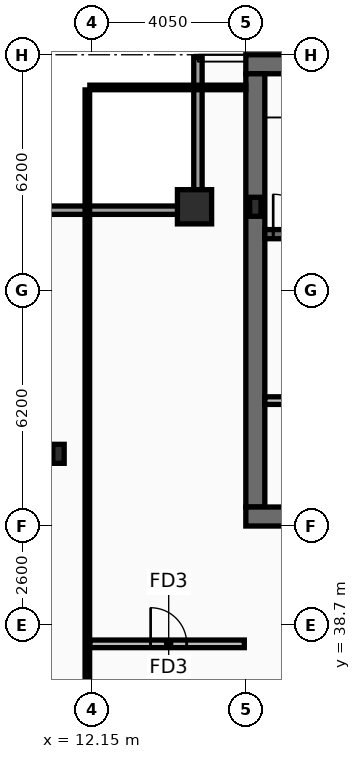
"""IFC4 building model, lengths in metres.
Left out: names, types, materials, properties, quantities, classifications, styles, units other than length and angle.
Written with IfcOpenShell. Run it as: python <this file> out.ifc"""

import sys

from ifc_helpers import new_model, si_unit, direction, frame, frame_2d, origin, origin_2d, place, context, subcontext, project, spatial, rectangle, hollow_rectangle, i_section, extrude, element, fill, save


model = new_model("IFC4")
c1 = context("Model", 3, precision=1e-05, world=origin(), true_north=direction((0.0, 1.0)))
c2 = subcontext(c1, "Body", "Model", "MODEL_VIEW")
j1 = project(units=[si_unit("LENGTHUNIT", "METRE"), si_unit("PLANEANGLEUNIT", "RADIAN")], contexts=[c1])
p1 = place(None, origin())
s1 = spatial("IfcSite", under=j1, at=p1, CompositionType="ELEMENT")
p2 = place(p1, origin())
s2 = spatial("IfcBuilding", under=s1, at=p2, CompositionType="ELEMENT")
p3 = place(p2, frame((0.0, 0.0, 367.4)))
s3 = spatial("IfcBuildingStorey", under=s2, at=p3, CompositionType="ELEMENT", Elevation=367.4)
p4 = place(p3, frame((16.2, 53.45, 0.0), z_axis=(0.0, 0.0, 1.0), x_axis=(1.0, 0.0, 0.0)))
e1 = element("IfcWall", 1, at=p4, inside=s3, PredefinedType="SHEAR", context=c2, shape_type="SweptSolid", body=[
    extrude(rectangle(XDim=40.5, YDim=0.5, at=frame_2d((20.25, 0.0))), origin(), (0.0, 0.0, 1.0), 5.4),
])
p5 = place(p3, frame((16.45, 41.8, 0.0), z_axis=(0.0, 0.0, 1.0), x_axis=(0.0, 1.0, 0.0)))
e2 = element("IfcWall", 2, at=p5, inside=s3, PredefinedType="SHEAR", context=c2, shape_type="SweptSolid", body=[
    extrude(rectangle(XDim=11.4, YDim=0.5, at=frame_2d((5.7, 0.0))), origin(), (0.0, 0.0, 1.0), 5.4),
])
p6 = place(p3, frame((18.65, 41.55, 0.0), z_axis=(0.0, 0.0, 1.0), x_axis=(-1.0, 0.0, 0.0)))
e3 = element("IfcWall", 3, at=p6, inside=s3, PredefinedType="SHEAR", context=c2, shape_type="SweptSolid", body=[
    extrude(rectangle(XDim=2.45, YDim=0.5, at=frame_2d((1.225, 0.0))), origin(), (0.0, 0.0, 1.0), 5.4),
])
p7 = place(p3, frame((16.7, 48.98, 0.0), z_axis=(0.0, 0.0, 1.0), x_axis=(1.0, 0.0, 0.0)))
e4 = element("IfcWall", 4, at=p7, inside=s3, PredefinedType="SHEAR", context=c2, shape_type="SweptSolid", body=[
    extrude(rectangle(XDim=7.52, YDim=0.24, at=frame_2d((3.76, 0.0))), origin(), (0.0, 0.0, 1.0), 5.4),
])
p8 = place(p7, frame((0.22, 0.0, 0.0)))
e5 = element("IfcOpeningElement", 5, at=p8, cuts=e4, PredefinedType="OPENING", context=c2, shape_type="SweptSolid", body=[
    extrude(rectangle(XDim=1.05, YDim=2.15, at=frame_2d((0.525, 1.075))), frame((0.0, 0.13, 0.0), z_axis=(0.0, -1.0, 0.0), x_axis=(1.0, 0.0, 0.0)), (0.0, 0.0, 1.0), 0.26),
])
p9 = place(p3, frame((14.85, 49.7, 0.0), z_axis=(0.0, 0.0, 1.0), x_axis=(1.0, 0.0, 0.0)))
e6 = element("IfcColumn", 6, at=p9, inside=s3, PredefinedType="COLUMN", context=c2, shape_type="SweptSolid", body=[
    extrude(hollow_rectangle(XDim=0.9, YDim=0.9, WallThickness=0.05, at=origin_2d()), origin(), (0.0, 0.0, 1.0), 5.6),
])
for number, where, z_axis, x_axis in (
    (7, (11.27, 43.2, 0.0), (0.0, 0.0, 1.0), (1.0, 0.0, 0.0)),
    (8, (16.45, 49.7, 0.0), (0.0, 0.0, 1.0), (1.0, 0.0, 0.0)),
):
    element("IfcColumn", number, at=place(p3, frame(where, z_axis=z_axis, x_axis=x_axis)), inside=s3, PredefinedType="COLUMN", context=c2, shape_type="SweptSolid", body=[
        extrude(i_section(OverallWidth=0.3, OverallDepth=0.5, WebThickness=0.014, FlangeThickness=0.028, at=origin_2d()), origin(), (0.0, 0.0, 1.0), 5.6),
    ])
p10 = place(p3, frame((10.92, 49.61, 0.0), z_axis=(0.0, 0.0, 1.0), x_axis=(1.0, 0.0, 0.0)))
e9 = element("IfcWall", 9, at=p10, inside=s3, PredefinedType="SOLIDWALL", context=c2, shape_type="SweptSolid", body=[
    extrude(rectangle(XDim=4.13, YDim=0.22, at=frame_2d((2.065, 0.0))), origin(), (0.0, 0.0, 1.0), 4.84),
])
p11 = place(p3, frame((14.94, 49.72, 0.0), z_axis=(0.0, 0.0, 1.0), x_axis=(0.0, 1.0, 0.0)))
e10 = element("IfcWall", 10, at=p11, inside=s3, PredefinedType="SOLIDWALL", context=c2, shape_type="SweptSolid", body=[
    extrude(rectangle(XDim=3.91, YDim=0.22, at=frame_2d((1.955, 0.0))), origin(), (0.0, 0.0, 1.0), 4.84),
])
p12 = place(p3, frame((16.7, 44.6, 0.0), z_axis=(0.0, 0.0, 1.0), x_axis=(1.0, 0.0, 0.0)))
e11 = element("IfcWall", 11, at=p12, inside=s3, PredefinedType="PARTITIONING", context=c2, shape_type="SweptSolid", body=[
    extrude(rectangle(XDim=4.3, YDim=0.2, at=frame_2d((2.15, 0.0))), origin(), (0.0, 0.0, 1.0), 5.4),
])
p13 = place(p12, frame((1.25, 0.0, 0.0)))
e12 = element("IfcOpeningElement", 12, at=p13, cuts=e11, PredefinedType="OPENING", context=c2, shape_type="SweptSolid", body=[
    extrude(rectangle(XDim=1.05, YDim=2.15, at=frame_2d((0.525, 1.075))), frame((0.0, 0.11, 0.0), z_axis=(0.0, -1.0, 0.0), x_axis=(1.0, 0.0, 0.0)), (0.0, 0.0, 1.0), 0.22),
])
p14 = place(p3, frame((12.095, 38.2, 0.0), z_axis=(0.0, 0.0, 1.0), x_axis=(1.0, 0.0, 0.0)))
e13 = element("IfcWall", 13, at=p14, inside=s3, PredefinedType="PARTITIONING", context=c2, shape_type="SweptSolid", body=[
    extrude(rectangle(XDim=4.065, YDim=0.2, at=frame_2d((2.032, 0.0))), origin(), (0.0, 0.0, 1.0), 5.4),
])
p15 = place(p14, frame((1.6, 0.0, 0.0)))
e14 = element("IfcOpeningElement", 14, at=p15, cuts=e13, PredefinedType="OPENING", context=c2, shape_type="SweptSolid", body=[
    extrude(rectangle(XDim=0.95, YDim=2.1, at=frame_2d((0.475, 1.05))), frame((0.0, 0.11, 0.0), z_axis=(0.0, -1.0, 0.0), x_axis=(1.0, 0.0, 0.0)), (0.0, 0.0, 1.0), 0.22),
])
p16 = place(p3, frame((12.03, 10.665, 0.0), z_axis=(0.0, 0.0, 1.0), x_axis=(0.0, 1.0, 0.0)))
e15 = element("IfcWall", 15, at=p16, inside=s3, PredefinedType="PARTITIONING", context=c2, shape_type="SweptSolid", body=[
    extrude(rectangle(XDim=42.11, YDim=0.12, at=frame_2d((21.055, 0.0))), origin(), (0.0, 0.0, 1.0), 4.79),
])
p17 = place(p3, frame((12.095, 52.84, 0.0), z_axis=(0.0, 0.0, 1.0), x_axis=(1.0, 0.0, 0.0)))
e16 = element("IfcWall", 16, at=p17, inside=s3, PredefinedType="PARTITIONING", context=c2, shape_type="SweptSolid", body=[
    extrude(rectangle(XDim=4.105, YDim=0.12, at=frame_2d((2.052, 0.0))), origin(), (0.0, 0.0, 1.0), 5.4),
])
p18 = place(p8, origin())
e17 = element("IfcDoor", 17, at=p18, inside=s3, OperationType="SINGLE_SWING_LEFT", PredefinedType="DOOR", context=c2, shape_type="SweptSolid", body=[
    extrude(rectangle(XDim=1.05, YDim=2.15, at=frame_2d((0.525, 1.075))), frame((0.0, 0.025, 0.0), z_axis=(0.0, -1.0, 0.0), x_axis=(1.0, 0.0, 0.0)), (0.0, 0.0, 1.0), 0.05),
])
fill(e5, e17)
p19 = place(p15, origin())
e18 = element("IfcDoor", 18, at=p19, inside=s3, OperationType="SINGLE_SWING_LEFT", PredefinedType="DOOR", context=c2, shape_type="SweptSolid", body=[
    extrude(rectangle(XDim=0.95, YDim=2.1, at=frame_2d((0.475, 1.05))), frame((0.0, 0.025, 0.0), z_axis=(0.0, -1.0, 0.0), x_axis=(1.0, 0.0, 0.0)), (0.0, 0.0, 1.0), 0.05),
])
fill(e14, e18)
save(model, sys.argv[1])
